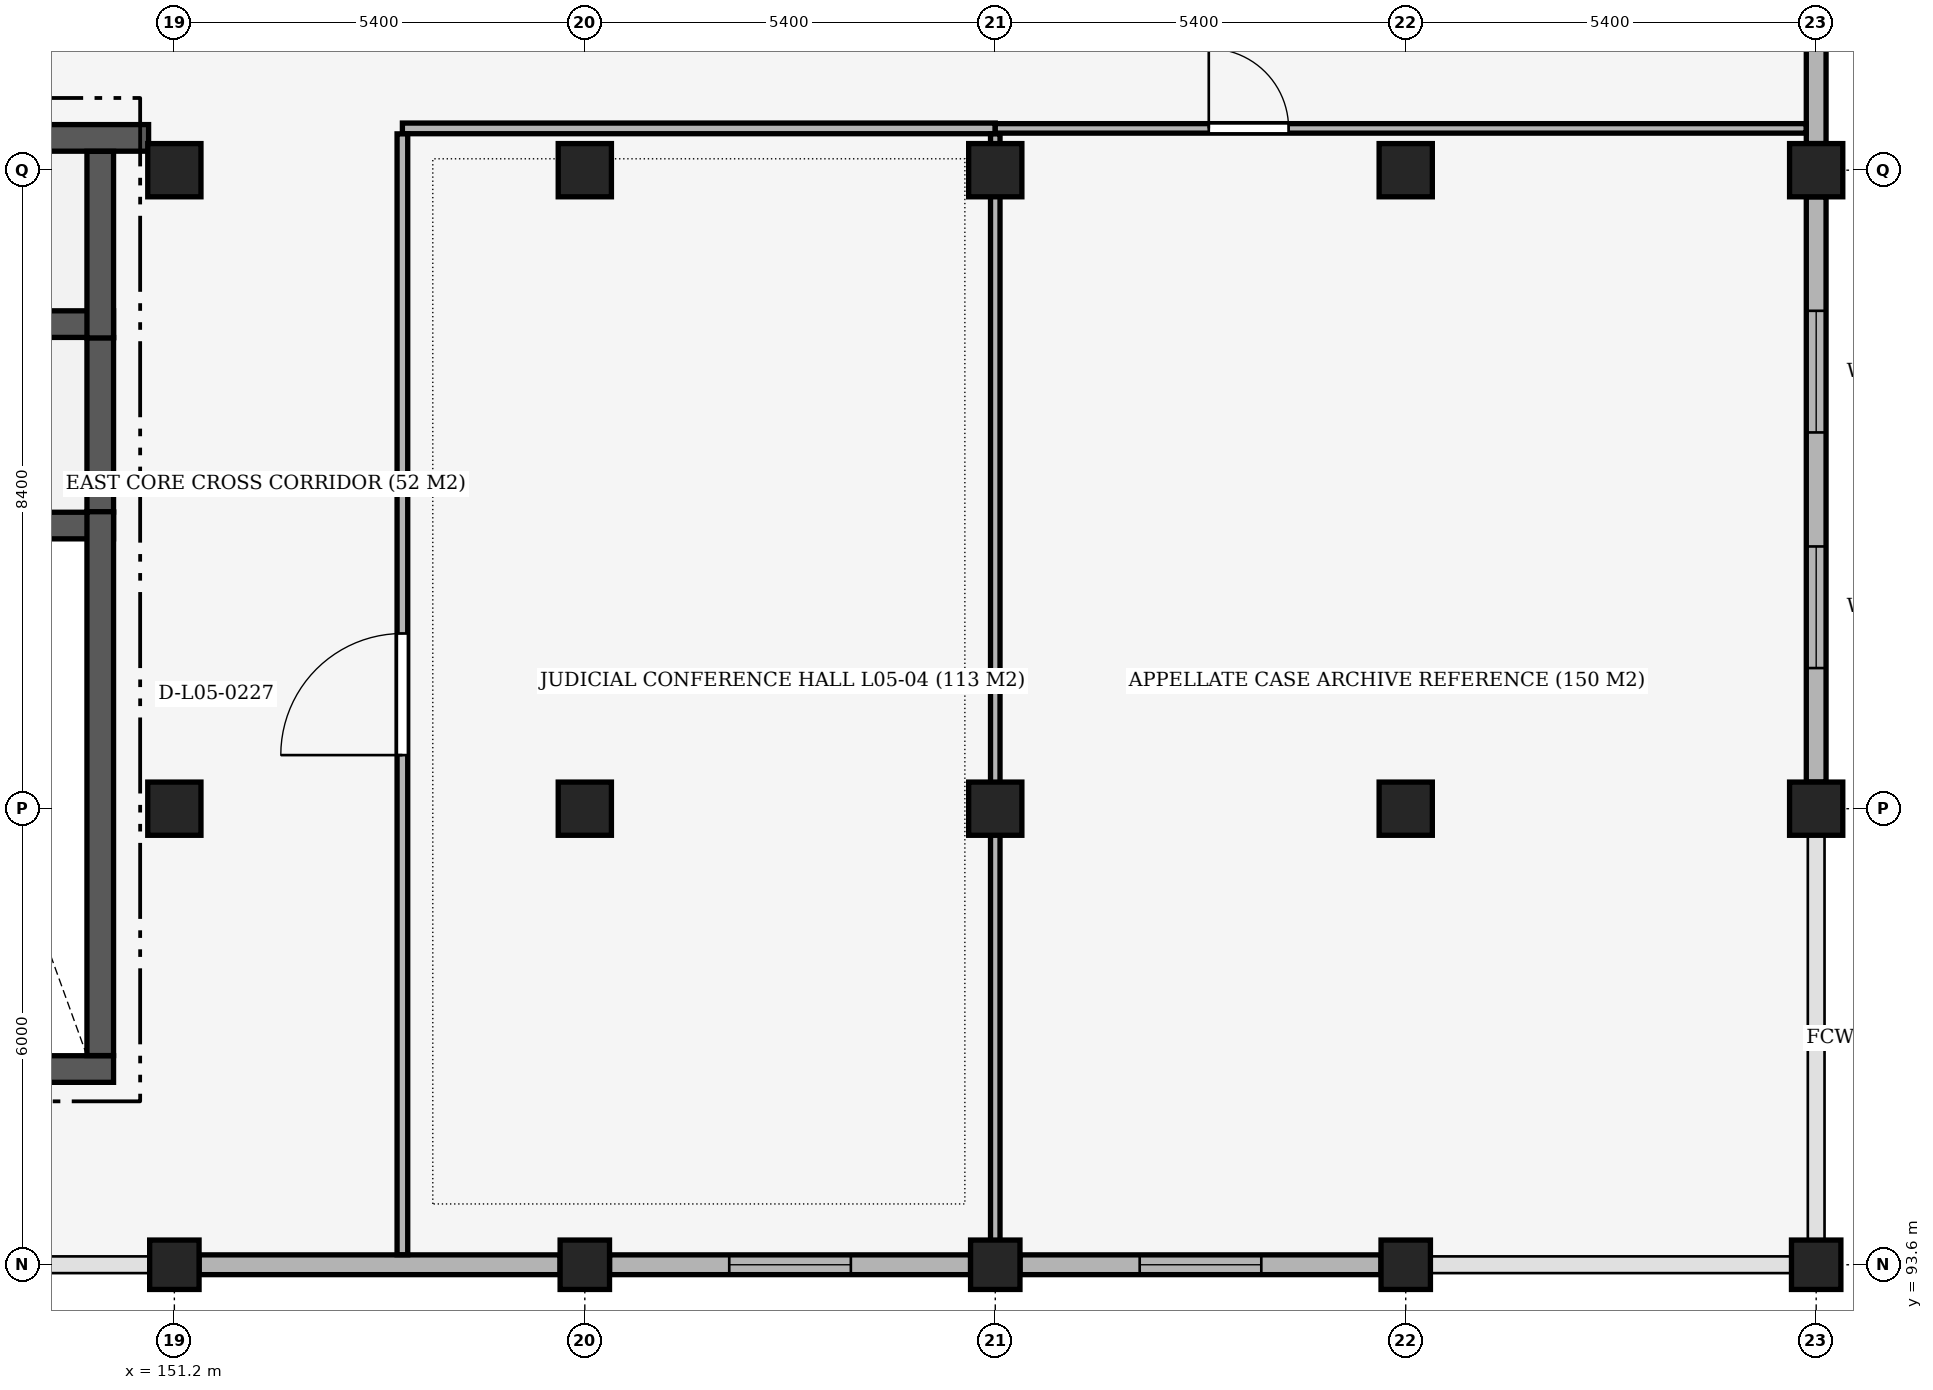
"""IFC4 building model, lengths in metres.
Left out: names, types, materials, properties, quantities, classifications, styles, units other than length and angle.
Written with IfcOpenShell. Run it as: python <this file> out.ifc"""

import sys

from ifc_helpers import new_model, si_unit, direction, frame, frame_2d, origin, origin_2d, place, context, subcontext, project, spatial, rectangle, extrude, element, fill, save


model = new_model("IFC4")
c1 = context("Model", 3, precision=1e-05, world=origin(), true_north=direction((0.0, 1.0)))
c2 = subcontext(c1, "Body", "Model", "MODEL_VIEW")
j1 = project(units=[si_unit("LENGTHUNIT", "METRE"), si_unit("PLANEANGLEUNIT", "RADIAN")], contexts=[c1])
p1 = place(None, origin())
s1 = spatial("IfcSite", under=j1, at=p1, CompositionType="ELEMENT")
p2 = place(p1, origin())
s2 = spatial("IfcBuilding", under=s1, at=p2, CompositionType="ELEMENT")
p3 = place(p2, frame((0.0, 0.0, 25.2)))
s3 = spatial("IfcBuildingStorey", under=s2, at=p3, CompositionType="ELEMENT", Elevation=25.2)
p4 = place(p3, frame((151.2, 93.6, 0.0), z_axis=(0.0, 0.0, 1.0), x_axis=(1.0, 0.0, 0.0)))
e1 = element("IfcColumn", 1, at=p4, inside=s3, PredefinedType="COLUMN", context=c2, shape_type="SweptSolid", body=[
    extrude(rectangle(XDim=0.65, YDim=0.65, at=origin_2d()), origin(), (0.0, 0.0, 1.0), 4.2),
])
for number, where, z_axis, x_axis in (
    (2, (151.2, 99.6, 0.0), (0.0, 0.0, 1.0), (1.0, 0.0, 0.0)),
    (3, (151.2, 108.0, 0.0), (0.0, 0.0, 1.0), (1.0, 0.0, 0.0)),
):
    element("IfcColumn", number, at=place(p3, frame(where, z_axis=z_axis, x_axis=x_axis)), inside=s3, PredefinedType="COLUMN", context=c2, shape_type="SweptSolid", body=[
        extrude(rectangle(XDim=0.7, YDim=0.7, at=origin_2d()), origin(), (0.0, 0.0, 1.0), 4.2),
    ])
p5 = place(p3, frame((156.6, 93.6, 0.0), z_axis=(0.0, 0.0, 1.0), x_axis=(1.0, 0.0, 0.0)))
e4 = element("IfcColumn", 4, at=p5, inside=s3, PredefinedType="COLUMN", context=c2, shape_type="SweptSolid", body=[
    extrude(rectangle(XDim=0.65, YDim=0.65, at=origin_2d()), origin(), (0.0, 0.0, 1.0), 4.2),
])
for number, where, z_axis, x_axis in (
    (5, (156.6, 99.6, 0.0), (0.0, 0.0, 1.0), (1.0, 0.0, 0.0)),
    (6, (156.6, 108.0, 0.0), (0.0, 0.0, 1.0), (1.0, 0.0, 0.0)),
):
    element("IfcColumn", number, at=place(p3, frame(where, z_axis=z_axis, x_axis=x_axis)), inside=s3, PredefinedType="COLUMN", context=c2, shape_type="SweptSolid", body=[
        extrude(rectangle(XDim=0.7, YDim=0.7, at=origin_2d()), origin(), (0.0, 0.0, 1.0), 4.2),
    ])
p6 = place(p3, frame((162.0, 93.6, 0.0), z_axis=(0.0, 0.0, 1.0), x_axis=(1.0, 0.0, 0.0)))
e7 = element("IfcColumn", 7, at=p6, inside=s3, PredefinedType="COLUMN", context=c2, shape_type="SweptSolid", body=[
    extrude(rectangle(XDim=0.65, YDim=0.65, at=origin_2d()), origin(), (0.0, 0.0, 1.0), 4.2),
])
for number, where, z_axis, x_axis in (
    (8, (162.0, 99.6, 0.0), (0.0, 0.0, 1.0), (1.0, 0.0, 0.0)),
    (9, (162.0, 108.0, 0.0), (0.0, 0.0, 1.0), (1.0, 0.0, 0.0)),
):
    element("IfcColumn", number, at=place(p3, frame(where, z_axis=z_axis, x_axis=x_axis)), inside=s3, PredefinedType="COLUMN", context=c2, shape_type="SweptSolid", body=[
        extrude(rectangle(XDim=0.7, YDim=0.7, at=origin_2d()), origin(), (0.0, 0.0, 1.0), 4.2),
    ])
p7 = place(p3, frame((167.4, 93.6, 0.0), z_axis=(0.0, 0.0, 1.0), x_axis=(1.0, 0.0, 0.0)))
e10 = element("IfcColumn", 10, at=p7, inside=s3, PredefinedType="COLUMN", context=c2, shape_type="SweptSolid", body=[
    extrude(rectangle(XDim=0.65, YDim=0.65, at=origin_2d()), origin(), (0.0, 0.0, 1.0), 4.2),
])
for number, where, z_axis, x_axis in (
    (11, (167.4, 99.6, 0.0), (0.0, 0.0, 1.0), (1.0, 0.0, 0.0)),
    (12, (167.4, 108.0, 0.0), (0.0, 0.0, 1.0), (1.0, 0.0, 0.0)),
):
    element("IfcColumn", number, at=place(p3, frame(where, z_axis=z_axis, x_axis=x_axis)), inside=s3, PredefinedType="COLUMN", context=c2, shape_type="SweptSolid", body=[
        extrude(rectangle(XDim=0.7, YDim=0.7, at=origin_2d()), origin(), (0.0, 0.0, 1.0), 4.2),
    ])
p8 = place(p3, frame((172.8, 93.6, 0.0), z_axis=(0.0, 0.0, 1.0), x_axis=(1.0, 0.0, 0.0)))
e13 = element("IfcColumn", 13, at=p8, inside=s3, PredefinedType="COLUMN", context=c2, shape_type="SweptSolid", body=[
    extrude(rectangle(XDim=0.65, YDim=0.65, at=origin_2d()), origin(), (0.0, 0.0, 1.0), 4.2),
])
for number, where, z_axis, x_axis in (
    (14, (172.8, 99.6, 0.0), (0.0, 0.0, 1.0), (1.0, 0.0, 0.0)),
    (15, (172.8, 108.0, 0.0), (0.0, 0.0, 1.0), (1.0, 0.0, 0.0)),
):
    element("IfcColumn", number, at=place(p3, frame(where, z_axis=z_axis, x_axis=x_axis)), inside=s3, PredefinedType="COLUMN", context=c2, shape_type="SweptSolid", body=[
        extrude(rectangle(XDim=0.7, YDim=0.7, at=origin_2d()), origin(), (0.0, 0.0, 1.0), 4.2),
    ])
p9 = place(p3, frame((172.8, 113.05, 0.0), z_axis=(0.0, 0.0, 1.0), x_axis=(0.0, -1.0, 0.0)))
e16 = element("IfcWall", 16, at=p9, inside=s3, PredefinedType="SOLIDWALL", context=c2, shape_type="SweptSolid", body=[
    extrude(rectangle(XDim=4.7, YDim=0.26, at=frame_2d((2.35, 0.0))), origin(), (0.0, 0.0, 1.0), 3.4),
])
p10 = place(p9, frame((1.55, 0.0, 1.05)))
e17 = element("IfcOpeningElement", 17, at=p10, cuts=e16, PredefinedType="OPENING", context=c2, shape_type="SweptSolid", body=[
    extrude(rectangle(XDim=1.6, YDim=1.8, at=frame_2d((0.8, 0.9))), frame((0.0, 0.145, 0.0), z_axis=(0.0, -1.0, 0.0), x_axis=(1.0, 0.0, 0.0)), (0.0, 0.0, 1.0), 0.29),
])
p11 = place(p3, frame((172.8, 107.65, 0.0), z_axis=(0.0, 0.0, 1.0), x_axis=(0.0, -1.0, 0.0)))
e18 = element("IfcWall", 18, at=p11, inside=s3, PredefinedType="SOLIDWALL", context=c2, shape_type="SweptSolid", body=[
    extrude(rectangle(XDim=7.7, YDim=0.26, at=frame_2d((3.85, 0.0))), origin(), (0.0, 0.0, 1.0), 3.25),
])
p12 = place(p11, frame((1.5, 0.0, 1.05)))
e19 = element("IfcOpeningElement", 19, at=p12, cuts=e18, PredefinedType="OPENING", context=c2, shape_type="SweptSolid", body=[
    extrude(rectangle(XDim=1.6, YDim=1.8, at=frame_2d((0.8, 0.9))), frame((0.0, 0.145, 0.0), z_axis=(0.0, -1.0, 0.0), x_axis=(1.0, 0.0, 0.0)), (0.0, 0.0, 1.0), 0.29),
])
p13 = place(p11, frame((4.6, 0.0, 1.05)))
e20 = element("IfcOpeningElement", 20, at=p13, cuts=e18, PredefinedType="OPENING", context=c2, shape_type="SweptSolid", body=[
    extrude(rectangle(XDim=1.6, YDim=1.8, at=frame_2d((0.8, 0.9))), frame((0.0, 0.145, 0.0), z_axis=(0.0, -1.0, 0.0), x_axis=(1.0, 0.0, 0.0)), (0.0, 0.0, 1.0), 0.29),
])
p14 = place(p3, frame((167.075, 93.6, 0.0), z_axis=(0.0, 0.0, 1.0), x_axis=(-1.0, 0.0, 0.0)))
e21 = element("IfcWall", 21, at=p14, inside=s3, PredefinedType="SOLIDWALL", context=c2, shape_type="SweptSolid", body=[
    extrude(rectangle(XDim=4.75, YDim=0.26, at=frame_2d((2.375, 0.0))), origin(), (0.0, 0.0, 1.0), 3.35),
])
p15 = place(p14, frame((1.575, 0.0, 1.05)))
e22 = element("IfcOpeningElement", 22, at=p15, cuts=e21, PredefinedType="OPENING", context=c2, shape_type="SweptSolid", body=[
    extrude(rectangle(XDim=1.6, YDim=1.8, at=frame_2d((0.8, 0.9))), frame((0.0, 0.145, 0.0), z_axis=(0.0, -1.0, 0.0), x_axis=(1.0, 0.0, 0.0)), (0.0, 0.0, 1.0), 0.29),
])
p16 = place(p3, frame((161.675, 93.6, 0.0), z_axis=(0.0, 0.0, 1.0), x_axis=(-1.0, 0.0, 0.0)))
e23 = element("IfcWall", 23, at=p16, inside=s3, PredefinedType="SOLIDWALL", context=c2, shape_type="SweptSolid", body=[
    extrude(rectangle(XDim=4.75, YDim=0.26, at=frame_2d((2.375, 0.0))), origin(), (0.0, 0.0, 1.0), 3.35),
])
p17 = place(p16, frame((1.575, 0.0, 1.05)))
e24 = element("IfcOpeningElement", 24, at=p17, cuts=e23, PredefinedType="OPENING", context=c2, shape_type="SweptSolid", body=[
    extrude(rectangle(XDim=1.6, YDim=1.8, at=frame_2d((0.8, 0.9))), frame((0.0, 0.145, 0.0), z_axis=(0.0, -1.0, 0.0), x_axis=(1.0, 0.0, 0.0)), (0.0, 0.0, 1.0), 0.29),
])
p18 = place(p3, frame((156.275, 93.6, 0.0), z_axis=(0.0, 0.0, 1.0), x_axis=(-1.0, 0.0, 0.0)))
e25 = element("IfcWall", 25, at=p18, inside=s3, PredefinedType="SOLIDWALL", context=c2, shape_type="SweptSolid", body=[
    extrude(rectangle(XDim=4.75, YDim=0.26, at=frame_2d((2.375, 0.0))), origin(), (0.0, 0.0, 1.0), 3.35),
])
p19 = place(p3, frame((147.468, 103.325, 0.0), z_axis=(0.0, 0.0, 1.0), x_axis=(1.0, 0.0, 0.0)))
e26 = element("IfcWall", 26, at=p19, inside=s3, PredefinedType="SHEAR", context=c2, shape_type="SweptSolid", body=[
    extrude(rectangle(XDim=2.932, YDim=0.35, at=frame_2d((1.466, 0.0))), origin(), (0.0, 0.0, 1.0), 3.95),
])
p20 = place(p3, frame((147.2, 105.975, 0.0), z_axis=(0.0, 0.0, 1.0), x_axis=(1.0, 0.0, 0.0)))
e27 = element("IfcWall", 27, at=p20, inside=s3, PredefinedType="SHEAR", context=c2, shape_type="SweptSolid", body=[
    extrude(rectangle(XDim=3.2, YDim=0.35, at=frame_2d((1.6, 0.0))), origin(), (0.0, 0.0, 1.0), 3.95),
])
p21 = place(p3, frame((150.225, 103.502, 0.0), z_axis=(0.0, 0.0, 1.0), x_axis=(0.0, 1.0, 0.0)))
e28 = element("IfcWall", 28, at=p21, inside=s3, PredefinedType="SHEAR", context=c2, shape_type="SweptSolid", body=[
    extrude(rectangle(XDim=2.296, YDim=0.35, at=frame_2d((1.148, 0.0))), origin(), (0.0, 0.0, 1.0), 3.95),
])
p22 = place(p3, frame((147.2, 108.425, 0.0), z_axis=(0.0, 0.0, 1.0), x_axis=(1.0, 0.0, 0.0)))
e29 = element("IfcWall", 29, at=p22, inside=s3, PredefinedType="SHEAR", context=c2, shape_type="SweptSolid", body=[
    extrude(rectangle(XDim=3.661, YDim=0.35, at=frame_2d((1.831, 0.0))), origin(), (0.0, 0.0, 1.0), 3.95),
])
p23 = place(p3, frame((150.225, 105.793, 0.0), z_axis=(0.0, 0.0, 1.0), x_axis=(0.0, 1.0, 0.0)))
e30 = element("IfcWall", 30, at=p23, inside=s3, PredefinedType="SHEAR", context=c2, shape_type="SweptSolid", body=[
    extrude(rectangle(XDim=2.455, YDim=0.35, at=frame_2d((1.228, 0.0))), origin(), (0.0, 0.0, 1.0), 3.95),
])
p24 = place(p3, frame((147.55, 96.175, 0.0), z_axis=(0.0, 0.0, 1.0), x_axis=(1.0, 0.0, 0.0)))
e31 = element("IfcWall", 31, at=p24, inside=s3, PredefinedType="SHEAR", context=c2, shape_type="SweptSolid", body=[
    extrude(rectangle(XDim=2.85, YDim=0.35, at=frame_2d((1.425, 0.0))), origin(), (0.0, 0.0, 1.0), 3.95),
])
p25 = place(p3, frame((150.225, 96.352, 0.0), z_axis=(0.0, 0.0, 1.0), x_axis=(0.0, 1.0, 0.0)))
e32 = element("IfcWall", 32, at=p25, inside=s3, PredefinedType="SHEAR", context=c2, shape_type="SweptSolid", body=[
    extrude(rectangle(XDim=7.155, YDim=0.35, at=frame_2d((3.578, 0.0))), origin(), (0.0, 0.0, 1.0), 3.95),
])
p26 = place(p3, frame((154.2, 108.55, 0.0), z_axis=(0.0, 0.0, 1.0), x_axis=(1.0, 0.0, 0.0)))
e33 = element("IfcWall", 33, at=p26, inside=s3, PredefinedType="PARTITIONING", context=c2, shape_type="SweptSolid", body=[
    extrude(rectangle(XDim=7.8, YDim=0.14, at=frame_2d((3.9, 0.0))), origin(), (0.0, 0.0, 1.0), 3.4),
])
p27 = place(p3, frame((162.0, 108.55, 0.0), z_axis=(0.0, 0.0, 1.0), x_axis=(1.0, 0.0, 0.0)))
e34 = element("IfcWall", 34, at=p27, inside=s3, PredefinedType="PARTITIONING", context=c2, shape_type="SweptSolid", body=[
    extrude(rectangle(XDim=10.668, YDim=0.125, at=frame_2d((5.334, 0.0))), origin(), (0.0, 0.0, 1.0), 3.4),
])
p28 = place(p27, frame((2.809, 0.0, 0.0)))
e35 = element("IfcOpeningElement", 35, at=p28, cuts=e34, PredefinedType="OPENING", context=c2, shape_type="SweptSolid", body=[
    extrude(rectangle(XDim=1.05, YDim=2.1, at=frame_2d((0.525, 1.05))), frame((0.0, 0.077, 0.0), z_axis=(0.0, -1.0, 0.0), x_axis=(1.0, 0.0, 0.0)), (0.0, 0.0, 1.0), 0.155),
])
p29 = place(p3, frame((154.2, 93.732, 0.0), z_axis=(0.0, 0.0, 1.0), x_axis=(0.0, 1.0, 0.0)))
e36 = element("IfcWall", 36, at=p29, inside=s3, PredefinedType="PARTITIONING", context=c2, shape_type="SweptSolid", body=[
    extrude(rectangle(XDim=14.746, YDim=0.14, at=frame_2d((7.373, 0.0))), origin(), (0.0, 0.0, 1.0), 3.35),
])
p30 = place(p29, frame((6.573, 0.0, 0.0)))
e37 = element("IfcOpeningElement", 37, at=p30, cuts=e36, PredefinedType="OPENING", context=c2, shape_type="SweptSolid", body=[
    extrude(rectangle(XDim=1.6, YDim=2.3, at=frame_2d((0.8, 1.15))), frame((0.0, 0.085, 0.0), z_axis=(0.0, -1.0, 0.0), x_axis=(1.0, 0.0, 0.0)), (0.0, 0.0, 1.0), 0.17),
])
p31 = place(p3, frame((162.0, 93.61, 0.0), z_axis=(0.0, 0.0, 1.0), x_axis=(0.0, 1.0, 0.0)))
e38 = element("IfcWall", 38, at=p31, inside=s3, PredefinedType="PARTITIONING", context=c2, shape_type="SweptSolid", body=[
    extrude(rectangle(XDim=14.868, YDim=0.125, at=frame_2d((7.434, 0.0))), origin(), (0.0, 0.0, 1.0), 3.25),
])
p32 = place(p12, origin())
e39 = element("IfcWindow", 39, at=p32, inside=s3, PartitioningType="SINGLE_PANEL", PredefinedType="WINDOW", context=c2, shape_type="SweptSolid", body=[
    extrude(rectangle(XDim=1.6, YDim=1.8, at=frame_2d((0.8, 0.9))), frame((0.0, 0.03, 0.0), z_axis=(0.0, -1.0, 0.0), x_axis=(1.0, 0.0, 0.0)), (0.0, 0.0, 1.0), 0.06),
])
fill(e19, e39)
p33 = place(p13, origin())
e40 = element("IfcWindow", 40, at=p33, inside=s3, PartitioningType="SINGLE_PANEL", PredefinedType="WINDOW", context=c2, shape_type="SweptSolid", body=[
    extrude(rectangle(XDim=1.6, YDim=1.8, at=frame_2d((0.8, 0.9))), frame((0.0, 0.03, 0.0), z_axis=(0.0, -1.0, 0.0), x_axis=(1.0, 0.0, 0.0)), (0.0, 0.0, 1.0), 0.06),
])
fill(e20, e40)
p34 = place(p15, origin())
e41 = element("IfcWindow", 41, at=p34, inside=s3, PartitioningType="SINGLE_PANEL", PredefinedType="WINDOW", context=c2, shape_type="SweptSolid", body=[
    extrude(rectangle(XDim=1.6, YDim=1.8, at=frame_2d((0.8, 0.9))), frame((0.0, 0.03, 0.0), z_axis=(0.0, -1.0, 0.0), x_axis=(1.0, 0.0, 0.0)), (0.0, 0.0, 1.0), 0.06),
])
fill(e22, e41)
p35 = place(p17, origin())
e42 = element("IfcWindow", 42, at=p35, inside=s3, PartitioningType="SINGLE_PANEL", PredefinedType="WINDOW", context=c2, shape_type="SweptSolid", body=[
    extrude(rectangle(XDim=1.6, YDim=1.8, at=frame_2d((0.8, 0.9))), frame((0.0, 0.03, 0.0), z_axis=(0.0, -1.0, 0.0), x_axis=(1.0, 0.0, 0.0)), (0.0, 0.0, 1.0), 0.06),
])
fill(e24, e42)
p36 = place(p30, origin())
e43 = element("IfcDoor", 43, at=p36, inside=s3, OperationType="SINGLE_SWING_LEFT", PredefinedType="DOOR", context=c2, shape_type="SweptSolid", body=[
    extrude(rectangle(XDim=1.6, YDim=2.3, at=frame_2d((0.8, 1.15))), frame((0.0, 0.025, 0.0), z_axis=(0.0, -1.0, 0.0), x_axis=(1.0, 0.0, 0.0)), (0.0, 0.0, 1.0), 0.05),
])
fill(e37, e43)
p37 = place(p28, origin())
e44 = element("IfcDoor", 44, at=p37, inside=s3, OperationType="SINGLE_SWING_LEFT", PredefinedType="DOOR", context=c2, shape_type="SweptSolid", body=[
    extrude(rectangle(XDim=1.05, YDim=2.1, at=frame_2d((0.525, 1.05))), frame((0.0, 0.025, 0.0), z_axis=(0.0, -1.0, 0.0), x_axis=(1.0, 0.0, 0.0)), (0.0, 0.0, 1.0), 0.05),
])
fill(e35, e44)
save(model, sys.argv[1])
